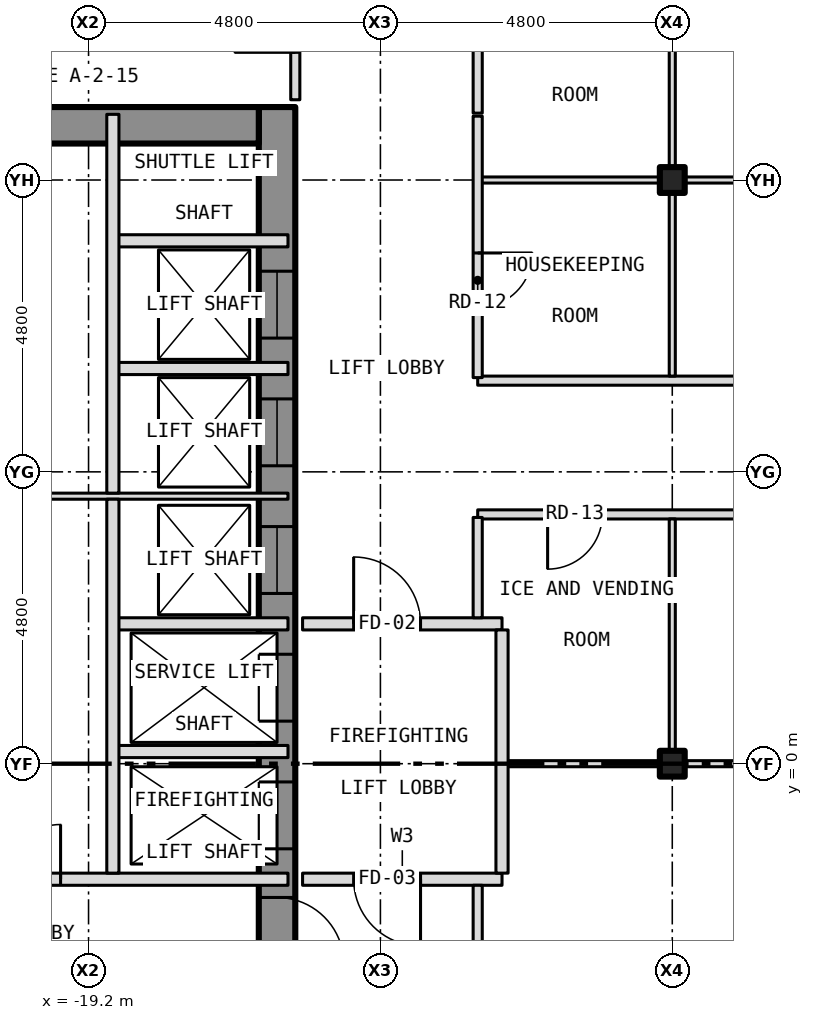
"""IFC4 building model, lengths in metres.
Left out: names, types, materials, properties, quantities, classifications, styles, units other than length and angle.
Written with IfcOpenShell. Run it as: python <this file> out.ifc"""

import sys

from ifc_helpers import new_model, si_unit, direction, frame, frame_2d, origin, origin_2d, place, context, subcontext, project, spatial, rectangle, i_section, extrude, element, fill, save


model = new_model("IFC4")
c1 = context("Model", 3, precision=1e-05, world=origin(), true_north=direction((0.0, 1.0)))
c2 = subcontext(c1, "Body", "Model", "MODEL_VIEW")
j1 = project(units=[si_unit("LENGTHUNIT", "METRE"), si_unit("PLANEANGLEUNIT", "RADIAN")], contexts=[c1])
p1 = place(None, origin())
s1 = spatial("IfcSite", under=j1, at=p1, CompositionType="ELEMENT")
p2 = place(p1, origin())
s2 = spatial("IfcBuilding", under=s1, at=p2, CompositionType="ELEMENT")
p3 = place(p2, frame((0.0, 0.0, 56.5)))
s3 = spatial("IfcBuildingStorey", under=s2, at=p3, CompositionType="ELEMENT", Elevation=56.5)
for number, where, z_axis, x_axis in (
    (1, (-9.6, 0.0, -0.15), (0.0, 0.0, 1.0), (1.0, 0.0, 0.0)),
    (2, (-9.6, 9.6, -0.15), (0.0, 0.0, 1.0), (1.0, 0.0, 0.0)),
):
    element("IfcColumn", number, at=place(p3, frame(where, z_axis=z_axis, x_axis=x_axis)), inside=s3, PredefinedType="COLUMN", context=c2, shape_type="SweptSolid", body=[
        extrude(i_section(OverallWidth=0.409, OverallDepth=0.424, WebThickness=0.033, FlangeThickness=0.052, at=origin_2d()), origin(), (0.0, 0.0, 1.0), 3.5),
    ])
p4 = place(p3, frame((-16.1, -10.8, 0.0), z_axis=(0.0, 0.0, 1.0), x_axis=(0.0, 1.0, 0.0)))
e3 = element("IfcWall", 3, at=p4, inside=s3, PredefinedType="SHEAR", context=c2, shape_type="SweptSolid", body=[
    extrude(rectangle(XDim=21.6, YDim=0.6, at=frame_2d((10.8, 0.0))), origin(), (0.0, 0.0, 1.0), 3.25),
])
p5 = place(p4, frame((9.4, 0.0, 0.0)))
e4 = element("IfcOpeningElement", 4, at=p5, cuts=e3, PredefinedType="OPENING", context=c2, shape_type="SweptSolid", body=[
    extrude(rectangle(XDim=1.1, YDim=2.1, at=frame_2d((0.55, 1.05))), frame((0.0, 0.312, 0.0), z_axis=(0.0, -1.0, 0.0), x_axis=(1.0, 0.0, 0.0)), (0.0, 0.0, 1.0), 0.624),
])
p6 = place(p4, frame((11.5, 0.0, 0.0)))
e5 = element("IfcOpeningElement", 5, at=p6, cuts=e3, PredefinedType="OPENING", context=c2, shape_type="SweptSolid", body=[
    extrude(rectangle(XDim=1.1, YDim=2.1, at=frame_2d((0.55, 1.05))), frame((0.0, 0.312, 0.0), z_axis=(0.0, -1.0, 0.0), x_axis=(1.0, 0.0, 0.0)), (0.0, 0.0, 1.0), 0.624),
])
p7 = place(p4, frame((13.6, 0.0, 0.0)))
e6 = element("IfcOpeningElement", 6, at=p7, cuts=e3, PredefinedType="OPENING", context=c2, shape_type="SweptSolid", body=[
    extrude(rectangle(XDim=1.1, YDim=2.1, at=frame_2d((0.55, 1.05))), frame((0.0, 0.312, 0.0), z_axis=(0.0, -1.0, 0.0), x_axis=(1.0, 0.0, 0.0)), (0.0, 0.0, 1.0), 0.624),
])
p8 = place(p4, frame((15.7, 0.0, 0.0)))
e7 = element("IfcOpeningElement", 7, at=p8, cuts=e3, PredefinedType="OPENING", context=c2, shape_type="SweptSolid", body=[
    extrude(rectangle(XDim=1.1, YDim=2.1, at=frame_2d((0.55, 1.05))), frame((0.0, 0.312, 0.0), z_axis=(0.0, -1.0, 0.0), x_axis=(1.0, 0.0, 0.0)), (0.0, 0.0, 1.0), 0.624),
])
p9 = place(p4, frame((17.8, 0.0, 0.0)))
e8 = element("IfcOpeningElement", 8, at=p9, cuts=e3, PredefinedType="OPENING", context=c2, shape_type="SweptSolid", body=[
    extrude(rectangle(XDim=1.1, YDim=2.1, at=frame_2d((0.55, 1.05))), frame((0.0, 0.312, 0.0), z_axis=(0.0, -1.0, 0.0), x_axis=(1.0, 0.0, 0.0)), (0.0, 0.0, 1.0), 0.624),
])
p10 = place(p4, frame((0.758, 0.0, 0.0)))
e9 = element("IfcOpeningElement", 9, at=p10, cuts=e3, PredefinedType="OPENING", context=c2, shape_type="SweptSolid", body=[
    extrude(rectangle(XDim=1.1, YDim=2.1, at=frame_2d((0.55, 1.05))), frame((0.0, 0.312, 0.0), z_axis=(0.0, -1.0, 0.0), x_axis=(1.0, 0.0, 0.0)), (0.0, 0.0, 1.0), 0.624),
])
p11 = place(p4, frame((7.5, 0.0, 0.0)))
e10 = element("IfcOpeningElement", 10, at=p11, cuts=e3, PredefinedType="OPENING", context=c2, shape_type="SweptSolid", body=[
    extrude(rectangle(XDim=1.1, YDim=2.1, at=frame_2d((0.55, 1.05))), frame((0.0, 0.312, 0.0), z_axis=(0.0, -1.0, 0.0), x_axis=(1.0, 0.0, 0.0)), (0.0, 0.0, 1.0), 0.624),
])
p12 = place(p3, frame((-23.4, 10.5, 0.0), z_axis=(0.0, 0.0, 1.0), x_axis=(1.0, 0.0, 0.0)))
e11 = element("IfcWall", 11, at=p12, inside=s3, PredefinedType="SHEAR", context=c2, shape_type="SweptSolid", body=[
    extrude(rectangle(XDim=7.0, YDim=0.6, at=frame_2d((3.5, 0.0))), origin(), (0.0, 0.0, 1.0), 3.25),
])
p13 = place(p3, frame((-23.88, -1.9, 0.0), z_axis=(0.0, 0.0, 1.0), x_axis=(1.0, 0.0, 0.0)))
e12 = element("IfcWall", 12, at=p13, inside=s3, PredefinedType="PARTITIONING", context=c2, shape_type="SweptSolid", body=[
    extrude(rectangle(XDim=7.96, YDim=0.2, at=frame_2d((3.98, 0.0))), origin(), (0.0, 0.0, 1.0), 3.25),
])
p14 = place(p13, frame((3.32, 0.0, 0.0)))
e13 = element("IfcOpeningElement", 13, at=p14, cuts=e12, PredefinedType="OPENING", context=c2, shape_type="SweptSolid", body=[
    extrude(rectangle(XDim=0.9, YDim=2.1, at=frame_2d((0.45, 1.05))), frame((0.0, 0.112, 0.0), z_axis=(0.0, -1.0, 0.0), x_axis=(1.0, 0.0, 0.0)), (0.0, 0.0, 1.0), 0.224),
])
p15 = place(p3, frame((-15.68, -1.9, 0.0), z_axis=(0.0, 0.0, 1.0), x_axis=(1.0, 0.0, 0.0)))
e14 = element("IfcWall", 14, at=p15, inside=s3, PredefinedType="PARTITIONING", context=c2, shape_type="SweptSolid", body=[
    extrude(rectangle(XDim=3.28, YDim=0.2, at=frame_2d((1.64, 0.0))), origin(), (0.0, 0.0, 1.0), 3.35),
])
p16 = place(p15, frame((0.84, 0.0, 0.0)))
e15 = element("IfcOpeningElement", 15, at=p16, cuts=e14, PredefinedType="OPENING", context=c2, shape_type="SweptSolid", body=[
    extrude(rectangle(XDim=1.1, YDim=2.1, at=frame_2d((0.55, 1.05))), frame((0.0, 0.112, 0.0), z_axis=(0.0, -1.0, 0.0), x_axis=(1.0, 0.0, 0.0)), (0.0, 0.0, 1.0), 0.224),
])
p17 = place(p3, frame((-12.4, 0.0, 0.0), z_axis=(0.0, 0.0, 1.0), x_axis=(1.0, 0.0, 0.0)))
e16 = element("IfcWall", 16, at=p17, inside=s3, PredefinedType="PARTITIONING", context=c2, shape_type="SweptSolid", body=[
    extrude(rectangle(XDim=2.596, YDim=0.1, at=frame_2d((1.298, 0.0))), origin(), (0.0, 0.0, 1.0), 2.728),
])
p18 = place(p3, frame((-9.804, 0.0, 0.0), z_axis=(0.0, 0.0, 1.0), x_axis=(1.0, 0.0, 0.0)))
e17 = element("IfcWall", 17, at=p18, inside=s3, PredefinedType="PARTITIONING", context=c2, shape_type="SweptSolid", body=[
    extrude(rectangle(XDim=0.408, YDim=0.1, at=frame_2d((0.204, 0.0))), origin(), (0.0, 0.0, 1.0), 3.35),
])
p19 = place(p3, frame((-9.396, 0.0, 0.0), z_axis=(0.0, 0.0, 1.0), x_axis=(1.0, 0.0, 0.0)))
e18 = element("IfcWall", 18, at=p19, inside=s3, PredefinedType="PARTITIONING", context=c2, shape_type="SweptSolid", body=[
    extrude(rectangle(XDim=9.192, YDim=0.1, at=frame_2d((4.596, 0.0))), origin(), (0.0, 0.0, 1.0), 2.728),
])
for number, where, z_axis, x_axis in (
    (19, (-18.8, 0.2, 0.0), (0.0, 0.0, 1.0), (1.0, 0.0, 0.0)),
    (20, (-18.8, 2.3, 0.0), (0.0, 0.0, 1.0), (1.0, 0.0, 0.0)),
):
    element("IfcWall", number, at=place(p3, frame(where, z_axis=z_axis, x_axis=x_axis)), inside=s3, PredefinedType="PARTITIONING", context=c2, shape_type="SweptSolid", body=[
        extrude(rectangle(XDim=2.88, YDim=0.2, at=frame_2d((1.44, 0.0))), origin(), (0.0, 0.0, 1.0), 3.25),
    ])
p20 = place(p3, frame((-15.68, 2.3, 0.0), z_axis=(0.0, 0.0, 1.0), x_axis=(1.0, 0.0, 0.0)))
e21 = element("IfcWall", 21, at=p20, inside=s3, PredefinedType="PARTITIONING", context=c2, shape_type="SweptSolid", body=[
    extrude(rectangle(XDim=3.28, YDim=0.2, at=frame_2d((1.64, 0.0))), origin(), (0.0, 0.0, 1.0), 3.35),
])
p21 = place(p20, frame((0.84, 0.0, 0.0)))
e22 = element("IfcOpeningElement", 22, at=p21, cuts=e21, PredefinedType="OPENING", context=c2, shape_type="SweptSolid", body=[
    extrude(rectangle(XDim=1.1, YDim=2.1, at=frame_2d((0.55, 1.05))), frame((0.0, 0.112, 0.0), z_axis=(0.0, -1.0, 0.0), x_axis=(1.0, 0.0, 0.0)), (0.0, 0.0, 1.0), 0.224),
])
p22 = place(p3, frame((-12.8, 4.1, 0.0), z_axis=(0.0, 0.0, 1.0), x_axis=(1.0, 0.0, 0.0)))
e23 = element("IfcWall", 23, at=p22, inside=s3, PredefinedType="PARTITIONING", context=c2, shape_type="SweptSolid", body=[
    extrude(rectangle(XDim=16.9, YDim=0.15, at=frame_2d((8.45, 0.0))), origin(), (0.0, 0.0, 1.0), 3.35),
])
p23 = place(p22, frame((1.15, 0.0, 0.0)))
e24 = element("IfcOpeningElement", 24, at=p23, cuts=e23, PredefinedType="OPENING", context=c2, shape_type="SweptSolid", body=[
    extrude(rectangle(XDim=0.9, YDim=2.1, at=frame_2d((0.45, 1.05))), frame((0.0, 0.087, 0.0), z_axis=(0.0, -1.0, 0.0), x_axis=(1.0, 0.0, 0.0)), (0.0, 0.0, 1.0), 0.174),
])
p24 = place(p22, frame((14.4, 0.0, 0.0)))
e25 = element("IfcOpeningElement", 25, at=p24, cuts=e23, PredefinedType="OPENING", context=c2, shape_type="SweptSolid", body=[
    extrude(rectangle(XDim=0.9, YDim=2.1, at=frame_2d((0.45, 1.05))), frame((0.0, 0.087, 0.0), z_axis=(0.0, -1.0, 0.0), x_axis=(1.0, 0.0, 0.0)), (0.0, 0.0, 1.0), 0.174),
])
p25 = place(p22, frame((7.55, 0.0, 0.0)))
e26 = element("IfcOpeningElement", 26, at=p25, cuts=e23, PredefinedType="OPENING", context=c2, shape_type="SweptSolid", body=[
    extrude(rectangle(XDim=0.9, YDim=2.1, at=frame_2d((0.45, 1.05))), frame((0.0, 0.087, 0.0), z_axis=(0.0, -1.0, 0.0), x_axis=(1.0, 0.0, 0.0)), (0.0, 0.0, 1.0), 0.174),
])
p26 = place(p3, frame((-23.88, 4.4, 0.0), z_axis=(0.0, 0.0, 1.0), x_axis=(1.0, 0.0, 0.0)))
e27 = element("IfcWall", 27, at=p26, inside=s3, PredefinedType="PARTITIONING", context=c2, shape_type="SweptSolid", body=[
    extrude(rectangle(XDim=7.96, YDim=0.1, at=frame_2d((3.98, 0.0))), origin(), (0.0, 0.0, 1.0), 3.25),
])
p27 = place(p26, frame((2.03, 0.0, 0.0)))
e28 = element("IfcOpeningElement", 28, at=p27, cuts=e27, PredefinedType="OPENING", context=c2, shape_type="SweptSolid", body=[
    extrude(rectangle(XDim=0.9, YDim=2.1, at=frame_2d((0.45, 1.05))), frame((0.0, 0.062, 0.0), z_axis=(0.0, -1.0, 0.0), x_axis=(1.0, 0.0, 0.0)), (0.0, 0.0, 1.0), 0.124),
])
p28 = place(p3, frame((-12.8, 6.3, 0.0), z_axis=(0.0, 0.0, 1.0), x_axis=(1.0, 0.0, 0.0)))
e29 = element("IfcWall", 29, at=p28, inside=s3, PredefinedType="PARTITIONING", context=c2, shape_type="SweptSolid", body=[
    extrude(rectangle(XDim=16.9, YDim=0.15, at=frame_2d((8.45, 0.0))), origin(), (0.0, 0.0, 1.0), 3.35),
])
p29 = place(p28, frame((14.4, 0.0, 0.0)))
e30 = element("IfcOpeningElement", 30, at=p29, cuts=e29, PredefinedType="OPENING", context=c2, shape_type="SweptSolid", body=[
    extrude(rectangle(XDim=0.9, YDim=2.1, at=frame_2d((0.45, 1.05))), frame((0.0, 0.087, 0.0), z_axis=(0.0, -1.0, 0.0), x_axis=(1.0, 0.0, 0.0)), (0.0, 0.0, 1.0), 0.174),
])
p30 = place(p28, frame((7.55, 0.0, 0.0)))
e31 = element("IfcOpeningElement", 31, at=p30, cuts=e29, PredefinedType="OPENING", context=c2, shape_type="SweptSolid", body=[
    extrude(rectangle(XDim=0.9, YDim=2.1, at=frame_2d((0.45, 1.05))), frame((0.0, 0.087, 0.0), z_axis=(0.0, -1.0, 0.0), x_axis=(1.0, 0.0, 0.0)), (0.0, 0.0, 1.0), 0.174),
])
for number, where, z_axis, x_axis in (
    (32, (-18.8, 6.5, 0.0), (0.0, 0.0, 1.0), (1.0, 0.0, 0.0)),
    (33, (-18.8, 8.6, 0.0), (0.0, 0.0, 1.0), (1.0, 0.0, 0.0)),
):
    element("IfcWall", number, at=place(p3, frame(where, z_axis=z_axis, x_axis=x_axis)), inside=s3, PredefinedType="PARTITIONING", context=c2, shape_type="SweptSolid", body=[
        extrude(rectangle(XDim=2.88, YDim=0.2, at=frame_2d((1.44, 0.0))), origin(), (0.0, 0.0, 1.0), 3.25),
    ])
p31 = place(p3, frame((-12.8, 9.6, 0.0), z_axis=(0.0, 0.0, 1.0), x_axis=(1.0, 0.0, 0.0)))
e34 = element("IfcWall", 34, at=p31, inside=s3, PredefinedType="PARTITIONING", context=c2, shape_type="SweptSolid", body=[
    extrude(rectangle(XDim=2.996, YDim=0.1, at=frame_2d((1.498, 0.0))), origin(), (0.0, 0.0, 1.0), 2.728),
])
p32 = place(p3, frame((-9.804, 9.6, 0.0), z_axis=(0.0, 0.0, 1.0), x_axis=(1.0, 0.0, 0.0)))
e35 = element("IfcWall", 35, at=p32, inside=s3, PredefinedType="PARTITIONING", context=c2, shape_type="SweptSolid", body=[
    extrude(rectangle(XDim=0.408, YDim=0.1, at=frame_2d((0.204, 0.0))), origin(), (0.0, 0.0, 1.0), 3.35),
])
p33 = place(p3, frame((-9.396, 9.6, 0.0), z_axis=(0.0, 0.0, 1.0), x_axis=(1.0, 0.0, 0.0)))
e36 = element("IfcWall", 36, at=p33, inside=s3, PredefinedType="PARTITIONING", context=c2, shape_type="SweptSolid", body=[
    extrude(rectangle(XDim=9.192, YDim=0.1, at=frame_2d((4.596, 0.0))), origin(), (0.0, 0.0, 1.0), 2.728),
])
p34 = place(p3, frame((-18.8, -1.8, 0.0), z_axis=(0.0, 0.0, 1.0), x_axis=(0.0, 1.0, 0.0)))
e37 = element("IfcWall", 37, at=p34, inside=s3, PredefinedType="PARTITIONING", context=c2, shape_type="SweptSolid", body=[
    extrude(rectangle(XDim=6.15, YDim=0.2, at=frame_2d((3.075, 0.0))), origin(), (0.0, 0.0, 1.0), 3.25),
])
p35 = place(p3, frame((-18.8, 4.45, 0.0), z_axis=(0.0, 0.0, 1.0), x_axis=(0.0, 1.0, 0.0)))
e38 = element("IfcWall", 38, at=p35, inside=s3, PredefinedType="PARTITIONING", context=c2, shape_type="SweptSolid", body=[
    extrude(rectangle(XDim=6.23, YDim=0.2, at=frame_2d((3.115, 0.0))), origin(), (0.0, 0.0, 1.0), 3.25),
])
p36 = place(p3, frame((-15.8, 10.92, 0.0), z_axis=(0.0, 0.0, 1.0), x_axis=(0.0, 1.0, 0.0)))
e39 = element("IfcWall", 39, at=p36, inside=s3, PredefinedType="PARTITIONING", context=c2, shape_type="SweptSolid", body=[
    extrude(rectangle(XDim=4.805, YDim=0.15, at=frame_2d((2.403, 0.0))), origin(), (0.0, 0.0, 1.0), 3.35),
])
p37 = place(p36, frame((0.78, 0.0, 0.0)))
e40 = element("IfcOpeningElement", 40, at=p37, cuts=e39, PredefinedType="OPENING", context=c2, shape_type="SweptSolid", body=[
    extrude(rectangle(XDim=1.0, YDim=2.1, at=frame_2d((0.5, 1.05))), frame((0.0, 0.087, 0.0), z_axis=(0.0, -1.0, 0.0), x_axis=(1.0, 0.0, 0.0)), (0.0, 0.0, 1.0), 0.174),
])
p38 = place(p3, frame((-12.8, -13.525, 0.0), z_axis=(0.0, 0.0, 1.0), x_axis=(0.0, 1.0, 0.0)))
e41 = element("IfcWall", 41, at=p38, inside=s3, PredefinedType="PARTITIONING", context=c2, shape_type="SweptSolid", body=[
    extrude(rectangle(XDim=11.525, YDim=0.15, at=frame_2d((5.762, 0.0))), origin(), (0.0, 0.0, 1.0), 3.35),
])
p39 = place(p38, frame((7.325, 0.0, 0.0)))
e42 = element("IfcOpeningElement", 42, at=p39, cuts=e41, PredefinedType="OPENING", context=c2, shape_type="SweptSolid", body=[
    extrude(rectangle(XDim=0.9, YDim=2.1, at=frame_2d((0.45, 1.05))), frame((0.0, 0.087, 0.0), z_axis=(0.0, -1.0, 0.0), x_axis=(1.0, 0.0, 0.0)), (0.0, 0.0, 1.0), 0.174),
])
p40 = place(p3, frame((-12.8, 2.4, 0.0), z_axis=(0.0, 0.0, 1.0), x_axis=(0.0, 1.0, 0.0)))
e43 = element("IfcWall", 43, at=p40, inside=s3, PredefinedType="PARTITIONING", context=c2, shape_type="SweptSolid", body=[
    extrude(rectangle(XDim=1.65, YDim=0.15, at=frame_2d((0.825, 0.0))), origin(), (0.0, 0.0, 1.0), 3.35),
])
p41 = place(p3, frame((-12.8, 6.35, 0.0), z_axis=(0.0, 0.0, 1.0), x_axis=(0.0, 1.0, 0.0)))
e44 = element("IfcWall", 44, at=p41, inside=s3, PredefinedType="PARTITIONING", context=c2, shape_type="SweptSolid", body=[
    extrude(rectangle(XDim=4.3, YDim=0.15, at=frame_2d((2.15, 0.0))), origin(), (0.0, 0.0, 1.0), 3.35),
])
p42 = place(p41, frame((1.15, 0.0, 0.0)))
e45 = element("IfcOpeningElement", 45, at=p42, cuts=e44, PredefinedType="OPENING", context=c2, shape_type="SweptSolid", body=[
    extrude(rectangle(XDim=0.9, YDim=2.1, at=frame_2d((0.45, 1.05))), frame((0.0, 0.087, 0.0), z_axis=(0.0, -1.0, 0.0), x_axis=(1.0, 0.0, 0.0)), (0.0, 0.0, 1.0), 0.174),
])
p43 = place(p3, frame((-12.8, 10.7, 0.0), z_axis=(0.0, 0.0, 1.0), x_axis=(0.0, 1.0, 0.0)))
e46 = element("IfcWall", 46, at=p43, inside=s3, PredefinedType="PARTITIONING", context=c2, shape_type="SweptSolid", body=[
    extrude(rectangle(XDim=2.825, YDim=0.15, at=frame_2d((1.413, 0.0))), origin(), (0.0, 0.0, 1.0), 3.35),
])
p44 = place(p3, frame((-12.4, -1.8, 0.0), z_axis=(0.0, 0.0, 1.0), x_axis=(0.0, 1.0, 0.0)))
e47 = element("IfcWall", 47, at=p44, inside=s3, PredefinedType="PARTITIONING", context=c2, shape_type="SweptSolid", body=[
    extrude(rectangle(XDim=4.0, YDim=0.2, at=frame_2d((2.0, 0.0))), origin(), (0.0, 0.0, 1.0), 3.35),
])
p45 = place(p3, frame((-9.6, 0.05, 0.0), z_axis=(0.0, 0.0, 1.0), x_axis=(0.0, 1.0, 0.0)))
e48 = element("IfcWall", 48, at=p45, inside=s3, PredefinedType="PARTITIONING", context=c2, shape_type="SweptSolid", body=[
    extrude(rectangle(XDim=3.975, YDim=0.1, at=frame_2d((1.987, 0.0))), origin(), (0.0, 0.0, 1.0), 2.728),
])
p46 = place(p3, frame((-9.6, 6.375, 0.0), z_axis=(0.0, 0.0, 1.0), x_axis=(0.0, 1.0, 0.0)))
e49 = element("IfcWall", 49, at=p46, inside=s3, PredefinedType="PARTITIONING", context=c2, shape_type="SweptSolid", body=[
    extrude(rectangle(XDim=3.175, YDim=0.1, at=frame_2d((1.587, 0.0))), origin(), (0.0, 0.0, 1.0), 2.728),
])
p47 = place(p3, frame((-9.6, 9.65, 0.0), z_axis=(0.0, 0.0, 1.0), x_axis=(0.0, 1.0, 0.0)))
e50 = element("IfcWall", 50, at=p47, inside=s3, PredefinedType="PARTITIONING", context=c2, shape_type="SweptSolid", body=[
    extrude(rectangle(XDim=3.875, YDim=0.1, at=frame_2d((1.938, 0.0))), origin(), (0.0, 0.0, 1.0), 2.728),
])
p48 = place(p5, origin())
e51 = element("IfcDoor", 51, at=p48, inside=s3, OperationType="SLIDING_TO_LEFT", PredefinedType="DOOR", context=c2, shape_type="SweptSolid", body=[
    extrude(rectangle(XDim=1.1, YDim=2.1, at=frame_2d((0.55, 1.05))), frame((0.0, 0.025, 0.0), z_axis=(0.0, -1.0, 0.0), x_axis=(1.0, 0.0, 0.0)), (0.0, 0.0, 1.0), 0.05),
])
fill(e4, e51)
p49 = place(p6, origin())
e52 = element("IfcDoor", 52, at=p49, inside=s3, OperationType="SLIDING_TO_LEFT", PredefinedType="DOOR", context=c2, shape_type="SweptSolid", body=[
    extrude(rectangle(XDim=1.1, YDim=2.1, at=frame_2d((0.55, 1.05))), frame((0.0, 0.025, 0.0), z_axis=(0.0, -1.0, 0.0), x_axis=(1.0, 0.0, 0.0)), (0.0, 0.0, 1.0), 0.05),
])
fill(e5, e52)
p50 = place(p7, origin())
e53 = element("IfcDoor", 53, at=p50, inside=s3, OperationType="SLIDING_TO_LEFT", PredefinedType="DOOR", context=c2, shape_type="SweptSolid", body=[
    extrude(rectangle(XDim=1.1, YDim=2.1, at=frame_2d((0.55, 1.05))), frame((0.0, 0.025, 0.0), z_axis=(0.0, -1.0, 0.0), x_axis=(1.0, 0.0, 0.0)), (0.0, 0.0, 1.0), 0.05),
])
fill(e6, e53)
p51 = place(p8, origin())
e54 = element("IfcDoor", 54, at=p51, inside=s3, OperationType="SLIDING_TO_LEFT", PredefinedType="DOOR", context=c2, shape_type="SweptSolid", body=[
    extrude(rectangle(XDim=1.1, YDim=2.1, at=frame_2d((0.55, 1.05))), frame((0.0, 0.025, 0.0), z_axis=(0.0, -1.0, 0.0), x_axis=(1.0, 0.0, 0.0)), (0.0, 0.0, 1.0), 0.05),
])
fill(e7, e54)
p52 = place(p9, origin())
e55 = element("IfcDoor", 55, at=p52, inside=s3, OperationType="SLIDING_TO_LEFT", PredefinedType="DOOR", context=c2, shape_type="SweptSolid", body=[
    extrude(rectangle(XDim=1.1, YDim=2.1, at=frame_2d((0.55, 1.05))), frame((0.0, 0.025, 0.0), z_axis=(0.0, -1.0, 0.0), x_axis=(1.0, 0.0, 0.0)), (0.0, 0.0, 1.0), 0.05),
])
fill(e8, e55)
p53 = place(p11, origin())
e56 = element("IfcDoor", 56, at=p53, inside=s3, OperationType="SINGLE_SWING_LEFT", PredefinedType="DOOR", context=c2, shape_type="SweptSolid", body=[
    extrude(rectangle(XDim=1.1, YDim=2.1, at=frame_2d((0.55, 1.05))), frame((0.0, 0.025, 0.0), z_axis=(0.0, -1.0, 0.0), x_axis=(1.0, 0.0, 0.0)), (0.0, 0.0, 1.0), 0.05),
])
fill(e10, e56)
p54 = place(p14, origin())
e57 = element("IfcDoor", 57, at=p54, inside=s3, OperationType="SINGLE_SWING_RIGHT", PredefinedType="DOOR", context=c2, shape_type="SweptSolid", body=[
    extrude(rectangle(XDim=0.9, YDim=2.1, at=frame_2d((0.45, 1.05))), frame((0.0, 0.025, 0.0), z_axis=(0.0, -1.0, 0.0), x_axis=(1.0, 0.0, 0.0)), (0.0, 0.0, 1.0), 0.05),
])
fill(e13, e57)
p55 = place(p21, origin())
e58 = element("IfcDoor", 58, at=p55, inside=s3, OperationType="SINGLE_SWING_LEFT", PredefinedType="DOOR", context=c2, shape_type="SweptSolid", body=[
    extrude(rectangle(XDim=1.1, YDim=2.1, at=frame_2d((0.55, 1.05))), frame((0.0, 0.025, 0.0), z_axis=(0.0, -1.0, 0.0), x_axis=(1.0, 0.0, 0.0)), (0.0, 0.0, 1.0), 0.05),
])
fill(e22, e58)
p56 = place(p16, origin())
e59 = element("IfcDoor", 59, at=p56, inside=s3, OperationType="SINGLE_SWING_RIGHT", PredefinedType="DOOR", context=c2, shape_type="SweptSolid", body=[
    extrude(rectangle(XDim=1.1, YDim=2.1, at=frame_2d((0.55, 1.05))), frame((0.0, 0.025, 0.0), z_axis=(0.0, -1.0, 0.0), x_axis=(1.0, 0.0, 0.0)), (0.0, 0.0, 1.0), 0.05),
])
fill(e15, e59)
p57 = place(p42, origin())
e60 = element("IfcDoor", 60, at=p57, inside=s3, OperationType="SINGLE_SWING_RIGHT", PredefinedType="DOOR", context=c2, shape_type="SweptSolid", body=[
    extrude(rectangle(XDim=0.9, YDim=2.1, at=frame_2d((0.45, 1.05))), frame((0.0, 0.025, 0.0), z_axis=(0.0, -1.0, 0.0), x_axis=(1.0, 0.0, 0.0)), (0.0, 0.0, 1.0), 0.05),
])
fill(e45, e60)
p58 = place(p23, origin())
e61 = element("IfcDoor", 61, at=p58, inside=s3, OperationType="SINGLE_SWING_LEFT", PredefinedType="DOOR", context=c2, shape_type="SweptSolid", body=[
    extrude(rectangle(XDim=0.9, YDim=2.1, at=frame_2d((0.45, 1.05))), frame((0.0, 0.025, 0.0), z_axis=(0.0, -1.0, 0.0), x_axis=(1.0, 0.0, 0.0)), (0.0, 0.0, 1.0), 0.05),
])
fill(e24, e61)
save(model, sys.argv[1])
